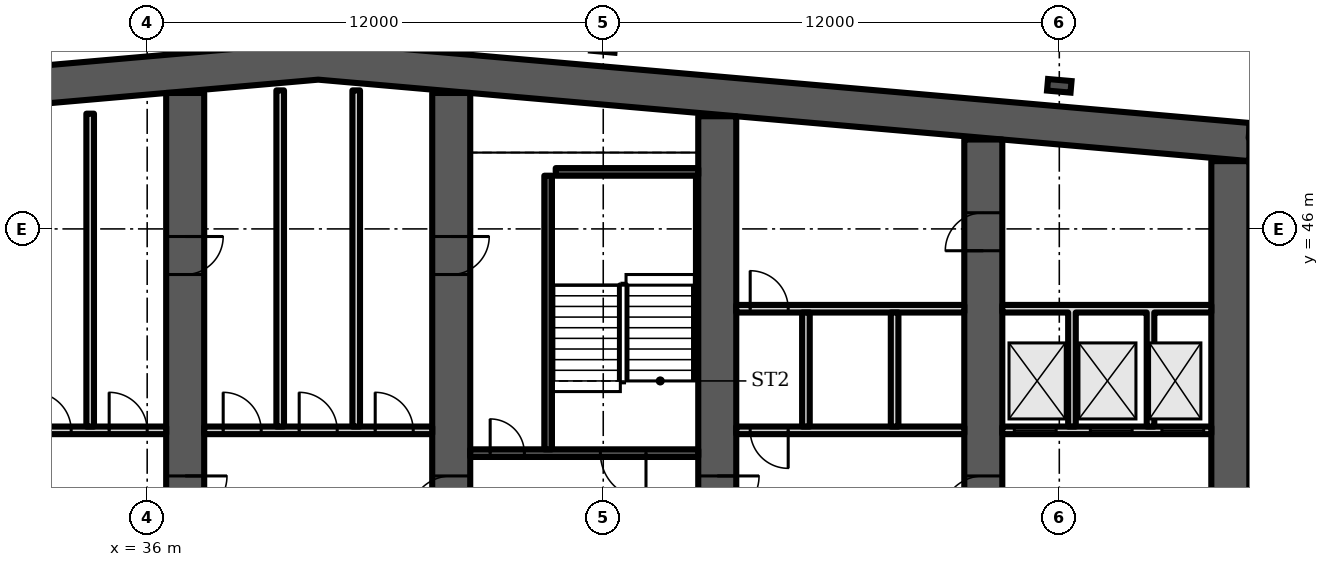
"""IFC4 building model, lengths in metres.
Left out: names, types, materials, properties, quantities, classifications, styles, units other than length and angle.
Written with IfcOpenShell. Run it as: python <this file> out.ifc"""

import sys

from ifc_helpers import new_model, si_unit, direction, frame, frame_2d, origin, origin_2d, place, context, subcontext, project, spatial, polyline, rectangle, i_section, outline, extrude, element, fill, save


model = new_model("IFC4")
c1 = context("Model", 3, precision=1e-05, world=origin(), true_north=direction((0.0, 1.0)))
c2 = subcontext(c1, "Body", "Model", "MODEL_VIEW")
j1 = project(units=[si_unit("LENGTHUNIT", "METRE"), si_unit("PLANEANGLEUNIT", "RADIAN")], contexts=[c1])
p1 = place(None, origin())
s1 = spatial("IfcSite", under=j1, at=p1, CompositionType="ELEMENT")
p2 = place(p1, origin())
s2 = spatial("IfcBuilding", under=s1, at=p2, CompositionType="ELEMENT")
p3 = place(p2, frame((0.0, 0.0, 96.7)))
s3 = spatial("IfcBuildingStorey", under=s2, at=p3, CompositionType="ELEMENT", Elevation=96.7)
p4 = place(p3, origin())
e1 = element("IfcWall", 1, at=p4, inside=s3, PredefinedType="SHEAR", context=c2, shape_type="SweptSolid", body=[
    extrude(outline(polyline([(16.0, 47.784), (40.5, 49.927), (65.0, 47.784), (65.0, 48.787), (40.5, 50.931), (16.0, 48.787), (16.0, 47.784)])), origin(), (0.0, 0.0, 1.0), 3.6),
])
p5 = place(p3, frame((37.0, 35.0, 0.0), z_axis=(0.0, 0.0, 1.0), x_axis=(0.0, 1.0, 0.0)))
e2 = element("IfcWall", 2, at=p5, inside=s3, PredefinedType="SHEAR", context=c2, shape_type="SweptSolid", body=[
    extrude(rectangle(XDim=14.577, YDim=1.0, at=frame_2d((7.289, 0.0))), origin(), (0.0, 0.0, 1.0), 3.6),
])
p6 = place(p5, frame((3.4, 0.0, 0.0)))
e3 = element("IfcOpeningElement", 3, at=p6, cuts=e2, PredefinedType="OPENING", context=c2, shape_type="SweptSolid", body=[
    extrude(rectangle(XDim=1.1, YDim=2.1, at=frame_2d((0.55, 1.05))), frame((0.0, 0.51, 0.0), z_axis=(0.0, -1.0, 0.0), x_axis=(1.0, 0.0, 0.0)), (0.0, 0.0, 1.0), 1.02),
])
p7 = place(p5, frame((9.8, 0.0, 0.0)))
e4 = element("IfcOpeningElement", 4, at=p7, cuts=e2, PredefinedType="OPENING", context=c2, shape_type="SweptSolid", body=[
    extrude(rectangle(XDim=1.0, YDim=2.1, at=frame_2d((0.5, 1.05))), frame((0.0, 0.51, 0.0), z_axis=(0.0, -1.0, 0.0), x_axis=(1.0, 0.0, 0.0)), (0.0, 0.0, 1.0), 1.02),
])
p8 = place(p3, frame((44.0, 35.0, 0.0), z_axis=(0.0, 0.0, 1.0), x_axis=(0.0, 1.0, 0.0)))
e5 = element("IfcWall", 5, at=p8, inside=s3, PredefinedType="SHEAR", context=c2, shape_type="SweptSolid", body=[
    extrude(rectangle(XDim=14.577, YDim=1.0, at=frame_2d((7.289, 0.0))), origin(), (0.0, 0.0, 1.0), 3.6),
])
p9 = place(p8, frame((3.4, 0.0, 0.0)))
e6 = element("IfcOpeningElement", 6, at=p9, cuts=e5, PredefinedType="OPENING", context=c2, shape_type="SweptSolid", body=[
    extrude(rectangle(XDim=1.1, YDim=2.1, at=frame_2d((0.55, 1.05))), frame((0.0, 0.51, 0.0), z_axis=(0.0, -1.0, 0.0), x_axis=(1.0, 0.0, 0.0)), (0.0, 0.0, 1.0), 1.02),
])
p10 = place(p8, frame((9.8, 0.0, 0.0)))
e7 = element("IfcOpeningElement", 7, at=p10, cuts=e5, PredefinedType="OPENING", context=c2, shape_type="SweptSolid", body=[
    extrude(rectangle(XDim=1.0, YDim=2.1, at=frame_2d((0.5, 1.05))), frame((0.0, 0.51, 0.0), z_axis=(0.0, -1.0, 0.0), x_axis=(1.0, 0.0, 0.0)), (0.0, 0.0, 1.0), 1.02),
])
p11 = place(p3, frame((51.0, 35.0, 0.0), z_axis=(0.0, 0.0, 1.0), x_axis=(0.0, 1.0, 0.0)))
e8 = element("IfcWall", 8, at=p11, inside=s3, PredefinedType="SHEAR", context=c2, shape_type="SweptSolid", body=[
    extrude(rectangle(XDim=13.965, YDim=1.0, at=frame_2d((6.982, 0.0))), origin(), (0.0, 0.0, 1.0), 3.6),
])
p12 = place(p11, frame((3.4, 0.0, 0.0)))
e9 = element("IfcOpeningElement", 9, at=p12, cuts=e8, PredefinedType="OPENING", context=c2, shape_type="SweptSolid", body=[
    extrude(rectangle(XDim=1.1, YDim=2.1, at=frame_2d((0.55, 1.05))), frame((0.0, 0.51, 0.0), z_axis=(0.0, -1.0, 0.0), x_axis=(1.0, 0.0, 0.0)), (0.0, 0.0, 1.0), 1.02),
])
p13 = place(p3, frame((58.0, 35.0, 0.0), z_axis=(0.0, 0.0, 1.0), x_axis=(0.0, 1.0, 0.0)))
e10 = element("IfcWall", 10, at=p13, inside=s3, PredefinedType="SHEAR", context=c2, shape_type="SweptSolid", body=[
    extrude(rectangle(XDim=13.352, YDim=1.0, at=frame_2d((6.676, 0.0))), origin(), (0.0, 0.0, 1.0), 3.6),
])
p14 = place(p13, frame((10.426, 0.0, 0.0)))
e11 = element("IfcOpeningElement", 11, at=p14, cuts=e10, PredefinedType="OPENING", context=c2, shape_type="SweptSolid", body=[
    extrude(rectangle(XDim=1.0, YDim=2.1, at=frame_2d((0.5, 1.05))), frame((0.0, 0.51, 0.0), z_axis=(0.0, -1.0, 0.0), x_axis=(1.0, 0.0, 0.0)), (0.0, 0.0, 1.0), 1.02),
])
p15 = place(p13, frame((3.4, 0.0, 0.0)))
e12 = element("IfcOpeningElement", 12, at=p15, cuts=e10, PredefinedType="OPENING", context=c2, shape_type="SweptSolid", body=[
    extrude(rectangle(XDim=1.1, YDim=2.1, at=frame_2d((0.55, 1.05))), frame((0.0, 0.51, 0.0), z_axis=(0.0, -1.0, 0.0), x_axis=(1.0, 0.0, 0.0)), (0.0, 0.0, 1.0), 1.02),
])
p16 = place(p3, frame((64.5, 35.0, 0.0), z_axis=(0.0, 0.0, 1.0), x_axis=(0.0, 1.0, 0.0)))
e13 = element("IfcWall", 13, at=p16, inside=s3, PredefinedType="SHEAR", context=c2, shape_type="SweptSolid", body=[
    extrude(rectangle(XDim=12.784, YDim=1.0, at=frame_2d((6.392, 0.0))), origin(), (0.0, 0.0, 1.0), 3.6),
])
for number, where, z_axis, x_axis in (
    (14, (48.0, 50.815, 0.0), (0.0, 0.0, 1.0), (0.087, 0.996, 0.0)),
    (15, (60.0, 49.765, 0.0), (0.0, 0.0, 1.0), (0.087, 0.996, 0.0)),
):
    element("IfcColumn", number, at=place(p3, frame(where, z_axis=z_axis, x_axis=x_axis)), inside=s3, PredefinedType="COLUMN", context=c2, shape_type="SweptSolid", body=[
        extrude(i_section(OverallWidth=0.305, OverallDepth=0.62, WebThickness=0.021, FlangeThickness=0.04, FilletRadius=0.027, at=origin_2d()), origin(), (0.0, 0.0, 1.0), 3.6),
    ])
p17 = place(p3, frame((67.983, 48.326, 0.0), z_axis=(0.0, 0.0, 1.0), x_axis=(-0.996194, 0.087168, 0.0)))
e16 = element("IfcWall", 16, at=p17, inside=s3, PredefinedType="SOLIDWALL", context=c2, shape_type="SweptSolid", body=[
    extrude(rectangle(XDim=2.994, YDim=0.4, at=frame_2d((1.497, 0.0))), origin(), (0.0, 0.0, 1.0), 3.2),
])
p18 = place(p3, frame((13.0, 49.263, 0.0), z_axis=(0.0, 0.0, 1.0), x_axis=(0.996193, 0.087159, 0.0)))
e17 = element("IfcWall", 17, at=p18, inside=s3, PredefinedType="PARAPET", context=c2, shape_type="SweptSolid", body=[
    extrude(rectangle(XDim=24.092, YDim=0.25, at=frame_2d((12.046, 0.0))), origin(), (0.0, 0.0, 1.0), 1.1),
])
p19 = place(p3, frame((30.5, 40.7, 0.0), z_axis=(0.0, 0.0, 1.0), x_axis=(1.0, 0.0, 0.0)))
e18 = element("IfcWall", 18, at=p19, inside=s3, PredefinedType="PARTITIONING", context=c2, shape_type="SweptSolid", body=[
    extrude(rectangle(XDim=6.0, YDim=0.2, at=frame_2d((3.0, 0.0))), origin(), (0.0, 0.0, 1.0), 3.2),
])
p20 = place(p19, frame((0.5, 0.0, 0.0)))
e19 = element("IfcOpeningElement", 19, at=p20, cuts=e18, PredefinedType="OPENING", context=c2, shape_type="SweptSolid", body=[
    extrude(rectangle(XDim=1.0, YDim=2.1, at=frame_2d((0.5, 1.05))), frame((0.0, 0.11, 0.0), z_axis=(0.0, -1.0, 0.0), x_axis=(1.0, 0.0, 0.0)), (0.0, 0.0, 1.0), 0.22),
])
p21 = place(p19, frame((2.5, 0.0, 0.0)))
e20 = element("IfcOpeningElement", 20, at=p21, cuts=e18, PredefinedType="OPENING", context=c2, shape_type="SweptSolid", body=[
    extrude(rectangle(XDim=1.0, YDim=2.1, at=frame_2d((0.5, 1.05))), frame((0.0, 0.11, 0.0), z_axis=(0.0, -1.0, 0.0), x_axis=(1.0, 0.0, 0.0)), (0.0, 0.0, 1.0), 0.22),
])
p22 = place(p19, frame((4.5, 0.0, 0.0)))
e21 = element("IfcOpeningElement", 21, at=p22, cuts=e18, PredefinedType="OPENING", context=c2, shape_type="SweptSolid", body=[
    extrude(rectangle(XDim=1.0, YDim=2.1, at=frame_2d((0.5, 1.05))), frame((0.0, 0.11, 0.0), z_axis=(0.0, -1.0, 0.0), x_axis=(1.0, 0.0, 0.0)), (0.0, 0.0, 1.0), 0.22),
])
p23 = place(p3, frame((34.5, 40.8, 0.0), z_axis=(0.0, 0.0, 1.0), x_axis=(0.0, 1.0, 0.0)))
e22 = element("IfcWall", 22, at=p23, inside=s3, PredefinedType="PARTITIONING", context=c2, shape_type="SweptSolid", body=[
    extrude(rectangle(XDim=8.232, YDim=0.2, at=frame_2d((4.116, 0.0))), origin(), (0.0, 0.0, 1.0), 3.2),
])
p24 = place(p3, frame((37.5, 40.7, 0.0), z_axis=(0.0, 0.0, 1.0), x_axis=(1.0, 0.0, 0.0)))
e23 = element("IfcWall", 23, at=p24, inside=s3, PredefinedType="PARTITIONING", context=c2, shape_type="SweptSolid", body=[
    extrude(rectangle(XDim=6.0, YDim=0.2, at=frame_2d((3.0, 0.0))), origin(), (0.0, 0.0, 1.0), 3.2),
])
p25 = place(p24, frame((0.5, 0.0, 0.0)))
e24 = element("IfcOpeningElement", 24, at=p25, cuts=e23, PredefinedType="OPENING", context=c2, shape_type="SweptSolid", body=[
    extrude(rectangle(XDim=1.0, YDim=2.1, at=frame_2d((0.5, 1.05))), frame((0.0, 0.11, 0.0), z_axis=(0.0, -1.0, 0.0), x_axis=(1.0, 0.0, 0.0)), (0.0, 0.0, 1.0), 0.22),
])
p26 = place(p24, frame((2.5, 0.0, 0.0)))
e25 = element("IfcOpeningElement", 25, at=p26, cuts=e23, PredefinedType="OPENING", context=c2, shape_type="SweptSolid", body=[
    extrude(rectangle(XDim=1.0, YDim=2.1, at=frame_2d((0.5, 1.05))), frame((0.0, 0.11, 0.0), z_axis=(0.0, -1.0, 0.0), x_axis=(1.0, 0.0, 0.0)), (0.0, 0.0, 1.0), 0.22),
])
p27 = place(p24, frame((4.5, 0.0, 0.0)))
e26 = element("IfcOpeningElement", 26, at=p27, cuts=e23, PredefinedType="OPENING", context=c2, shape_type="SweptSolid", body=[
    extrude(rectangle(XDim=1.0, YDim=2.1, at=frame_2d((0.5, 1.05))), frame((0.0, 0.11, 0.0), z_axis=(0.0, -1.0, 0.0), x_axis=(1.0, 0.0, 0.0)), (0.0, 0.0, 1.0), 0.22),
])
for number, where, z_axis, x_axis in (
    (27, (39.5, 40.8, 0.0), (0.0, 0.0, 1.0), (0.0, 1.0, 0.0)),
    (28, (41.5, 40.8, 0.0), (0.0, 0.0, 1.0), (0.0, 1.0, 0.0)),
):
    element("IfcWall", number, at=place(p3, frame(where, z_axis=z_axis, x_axis=x_axis)), inside=s3, PredefinedType="PARTITIONING", context=c2, shape_type="SweptSolid", body=[
        extrude(rectangle(XDim=8.844, YDim=0.2, at=frame_2d((4.422, 0.0))), origin(), (0.0, 0.0, 1.0), 3.2),
    ])
p28 = place(p3, frame((44.5, 40.1, 0.0), z_axis=(0.0, 0.0, 1.0), x_axis=(1.0, 0.0, 0.0)))
e29 = element("IfcWall", 29, at=p28, inside=s3, PredefinedType="SHEAR", context=c2, shape_type="SweptSolid", body=[
    extrude(rectangle(XDim=6.0, YDim=0.2, at=frame_2d((3.0, 0.0))), origin(), (0.0, 0.0, 1.0), 3.2),
])
p29 = place(p28, frame((3.425, 0.0, 0.0)))
e30 = element("IfcOpeningElement", 30, at=p29, cuts=e29, PredefinedType="OPENING", context=c2, shape_type="SweptSolid", body=[
    extrude(rectangle(XDim=1.2, YDim=2.1, at=frame_2d((0.6, 1.05))), frame((0.0, 0.11, 0.0), z_axis=(0.0, -1.0, 0.0), x_axis=(1.0, 0.0, 0.0)), (0.0, 0.0, 1.0), 0.22),
])
p30 = place(p28, frame((0.525, 0.0, 0.0)))
e31 = element("IfcOpeningElement", 31, at=p30, cuts=e29, PredefinedType="OPENING", context=c2, shape_type="SweptSolid", body=[
    extrude(rectangle(XDim=0.9, YDim=2.1, at=frame_2d((0.45, 1.05))), frame((0.0, 0.11, 0.0), z_axis=(0.0, -1.0, 0.0), x_axis=(1.0, 0.0, 0.0)), (0.0, 0.0, 1.0), 0.22),
])
p31 = place(p3, frame((46.55, 40.2, 0.0), z_axis=(0.0, 0.0, 1.0), x_axis=(0.0, 1.0, 0.0)))
e32 = element("IfcWall", 32, at=p31, inside=s3, PredefinedType="SHEAR", context=c2, shape_type="SweptSolid", body=[
    extrude(rectangle(XDim=7.2, YDim=0.2, at=frame_2d((3.6, 0.0))), origin(), (0.0, 0.0, 1.0), 3.2),
])
p32 = place(p3, frame((46.75, 47.5, 0.0), z_axis=(0.0, 0.0, 1.0), x_axis=(1.0, 0.0, 0.0)))
e33 = element("IfcWall", 33, at=p32, inside=s3, PredefinedType="SHEAR", context=c2, shape_type="SweptSolid", body=[
    extrude(rectangle(XDim=3.75, YDim=0.2, at=frame_2d((1.875, 0.0))), origin(), (0.0, 0.0, 1.0), 3.2),
])
p33 = place(p3, frame((51.5, 40.7, 0.0), z_axis=(0.0, 0.0, 1.0), x_axis=(1.0, 0.0, 0.0)))
e34 = element("IfcWall", 34, at=p33, inside=s3, PredefinedType="PARTITIONING", context=c2, shape_type="SweptSolid", body=[
    extrude(rectangle(XDim=6.0, YDim=0.2, at=frame_2d((3.0, 0.0))), origin(), (0.0, 0.0, 1.0), 3.2),
])
p34 = place(p33, frame((0.367, 0.0, 0.0)))
e35 = element("IfcOpeningElement", 35, at=p34, cuts=e34, PredefinedType="OPENING", context=c2, shape_type="SweptSolid", body=[
    extrude(rectangle(XDim=1.0, YDim=2.1, at=frame_2d((0.5, 1.05))), frame((0.0, 0.11, 0.0), z_axis=(0.0, -1.0, 0.0), x_axis=(1.0, 0.0, 0.0)), (0.0, 0.0, 1.0), 0.22),
])
p35 = place(p3, frame((51.5, 43.9, 0.0), z_axis=(0.0, 0.0, 1.0), x_axis=(1.0, 0.0, 0.0)))
e36 = element("IfcWall", 36, at=p35, inside=s3, PredefinedType="PARTITIONING", context=c2, shape_type="SweptSolid", body=[
    extrude(rectangle(XDim=6.0, YDim=0.2, at=frame_2d((3.0, 0.0))), origin(), (0.0, 0.0, 1.0), 3.2),
])
p36 = place(p35, frame((0.367, 0.0, 0.0)))
e37 = element("IfcOpeningElement", 37, at=p36, cuts=e36, PredefinedType="OPENING", context=c2, shape_type="SweptSolid", body=[
    extrude(rectangle(XDim=1.0, YDim=2.1, at=frame_2d((0.5, 1.05))), frame((0.0, 0.11, 0.0), z_axis=(0.0, -1.0, 0.0), x_axis=(1.0, 0.0, 0.0)), (0.0, 0.0, 1.0), 0.22),
])
p37 = place(p3, frame((0.0, 0.0, -0.0)))
e38 = element("IfcWall", 38, at=p37, inside=s3, PredefinedType="PARTITIONING", context=c2, shape_type="SweptSolid", body=[
    extrude(outline(polyline([(53.233, 40.8), (53.233, 43.8), (53.433, 43.8), (53.433, 40.8), (53.233, 40.8)])), origin(), (0.0, 0.0, 1.0), 3.2),
])
p38 = place(p3, frame((0.0, 0.0, -0.0)))
e39 = element("IfcWall", 39, at=p38, inside=s3, PredefinedType="PARTITIONING", context=c2, shape_type="SweptSolid", body=[
    extrude(outline(polyline([(55.567, 40.8), (55.567, 43.8), (55.767, 43.8), (55.767, 40.8), (55.567, 40.8)])), origin(), (0.0, 0.0, 1.0), 3.2),
])
p39 = place(p3, frame((58.5, 40.7, 0.0), z_axis=(0.0, 0.0, 1.0), x_axis=(1.0, 0.0, 0.0)))
e40 = element("IfcWall", 40, at=p39, inside=s3, PredefinedType="PARTITIONING", context=c2, shape_type="SweptSolid", body=[
    extrude(rectangle(XDim=5.5, YDim=0.2, at=frame_2d((2.75, 0.0))), origin(), (0.0, 0.0, 1.0), 3.2),
])
p40 = place(p39, frame((0.317, 0.0, 0.0)))
e41 = element("IfcOpeningElement", 41, at=p40, cuts=e40, PredefinedType="OPENING", context=c2, shape_type="SweptSolid", body=[
    extrude(rectangle(XDim=1.1, YDim=2.1, at=frame_2d((0.55, 1.05))), frame((0.0, 0.11, 0.0), z_axis=(0.0, -1.0, 0.0), x_axis=(1.0, 0.0, 0.0)), (0.0, 0.0, 1.0), 0.22),
])
p41 = place(p39, frame((2.317, 0.0, 0.0)))
e42 = element("IfcOpeningElement", 42, at=p41, cuts=e40, PredefinedType="OPENING", context=c2, shape_type="SweptSolid", body=[
    extrude(rectangle(XDim=1.1, YDim=2.1, at=frame_2d((0.55, 1.05))), frame((0.0, 0.11, 0.0), z_axis=(0.0, -1.0, 0.0), x_axis=(1.0, 0.0, 0.0)), (0.0, 0.0, 1.0), 0.22),
])
p42 = place(p39, frame((4.2, 0.0, 0.0)))
e43 = element("IfcOpeningElement", 43, at=p42, cuts=e40, PredefinedType="OPENING", context=c2, shape_type="SweptSolid", body=[
    extrude(rectangle(XDim=1.1, YDim=2.1, at=frame_2d((0.55, 1.05))), frame((0.0, 0.11, 0.0), z_axis=(0.0, -1.0, 0.0), x_axis=(1.0, 0.0, 0.0)), (0.0, 0.0, 1.0), 0.22),
])
p43 = place(p3, frame((0.0, 0.0, -0.0)))
e44 = element("IfcWall", 44, at=p43, inside=s3, PredefinedType="PARTITIONING", context=c2, shape_type="SweptSolid", body=[
    extrude(outline(polyline([(60.433, 40.8), (60.233, 40.8), (60.233, 43.8), (58.5, 43.8), (58.5, 44.0), (64.0, 44.0), (64.0, 43.8), (62.5, 43.8), (62.5, 40.8), (62.3, 40.8), (62.3, 43.8), (60.433, 43.8), (60.433, 40.8)])), origin(), (0.0, 0.0, 1.0), 3.2),
])
p44 = place(p21, origin())
e45 = element("IfcDoor", 45, at=p44, inside=s3, OperationType="SINGLE_SWING_LEFT", PredefinedType="DOOR", context=c2, shape_type="SweptSolid", body=[
    extrude(rectangle(XDim=1.0, YDim=2.1, at=frame_2d((0.5, 1.05))), frame((0.0, 0.025, 0.0), z_axis=(0.0, -1.0, 0.0), x_axis=(1.0, 0.0, 0.0)), (0.0, 0.0, 1.0), 0.05),
])
fill(e20, e45)
p45 = place(p22, origin())
e46 = element("IfcDoor", 46, at=p45, inside=s3, OperationType="SINGLE_SWING_LEFT", PredefinedType="DOOR", context=c2, shape_type="SweptSolid", body=[
    extrude(rectangle(XDim=1.0, YDim=2.1, at=frame_2d((0.5, 1.05))), frame((0.0, 0.025, 0.0), z_axis=(0.0, -1.0, 0.0), x_axis=(1.0, 0.0, 0.0)), (0.0, 0.0, 1.0), 0.05),
])
fill(e21, e46)
p46 = place(p25, origin())
e47 = element("IfcDoor", 47, at=p46, inside=s3, OperationType="SINGLE_SWING_LEFT", PredefinedType="DOOR", context=c2, shape_type="SweptSolid", body=[
    extrude(rectangle(XDim=1.0, YDim=2.1, at=frame_2d((0.5, 1.05))), frame((0.0, 0.025, 0.0), z_axis=(0.0, -1.0, 0.0), x_axis=(1.0, 0.0, 0.0)), (0.0, 0.0, 1.0), 0.05),
])
fill(e24, e47)
p47 = place(p26, origin())
e48 = element("IfcDoor", 48, at=p47, inside=s3, OperationType="SINGLE_SWING_LEFT", PredefinedType="DOOR", context=c2, shape_type="SweptSolid", body=[
    extrude(rectangle(XDim=1.0, YDim=2.1, at=frame_2d((0.5, 1.05))), frame((0.0, 0.025, 0.0), z_axis=(0.0, -1.0, 0.0), x_axis=(1.0, 0.0, 0.0)), (0.0, 0.0, 1.0), 0.05),
])
fill(e25, e48)
p48 = place(p27, origin())
e49 = element("IfcDoor", 49, at=p48, inside=s3, OperationType="SINGLE_SWING_LEFT", PredefinedType="DOOR", context=c2, shape_type="SweptSolid", body=[
    extrude(rectangle(XDim=1.0, YDim=2.1, at=frame_2d((0.5, 1.05))), frame((0.0, 0.025, 0.0), z_axis=(0.0, -1.0, 0.0), x_axis=(1.0, 0.0, 0.0)), (0.0, 0.0, 1.0), 0.05),
])
fill(e26, e49)
p49 = place(p29, origin())
e50 = element("IfcDoor", 50, at=p49, inside=s3, OperationType="SINGLE_SWING_RIGHT", PredefinedType="DOOR", context=c2, shape_type="SweptSolid", body=[
    extrude(rectangle(XDim=1.2, YDim=2.1, at=frame_2d((0.6, 1.05))), frame((0.0, 0.025, 0.0), z_axis=(0.0, -1.0, 0.0), x_axis=(1.0, 0.0, 0.0)), (0.0, 0.0, 1.0), 0.05),
])
fill(e30, e50)
p50 = place(p30, origin())
e51 = element("IfcDoor", 51, at=p50, inside=s3, OperationType="SINGLE_SWING_LEFT", PredefinedType="DOOR", context=c2, shape_type="SweptSolid", body=[
    extrude(rectangle(XDim=0.9, YDim=2.1, at=frame_2d((0.45, 1.05))), frame((0.0, 0.025, 0.0), z_axis=(0.0, -1.0, 0.0), x_axis=(1.0, 0.0, 0.0)), (0.0, 0.0, 1.0), 0.05),
])
fill(e31, e51)
p51 = place(p34, origin())
e52 = element("IfcDoor", 52, at=p51, inside=s3, OperationType="SINGLE_SWING_RIGHT", PredefinedType="DOOR", context=c2, shape_type="SweptSolid", body=[
    extrude(rectangle(XDim=1.0, YDim=2.1, at=frame_2d((0.5, 1.05))), frame((0.0, 0.025, 0.0), z_axis=(0.0, -1.0, 0.0), x_axis=(1.0, 0.0, 0.0)), (0.0, 0.0, 1.0), 0.05),
])
fill(e35, e52)
p52 = place(p36, origin())
e53 = element("IfcDoor", 53, at=p52, inside=s3, OperationType="SINGLE_SWING_LEFT", PredefinedType="DOOR", context=c2, shape_type="SweptSolid", body=[
    extrude(rectangle(XDim=1.0, YDim=2.1, at=frame_2d((0.5, 1.05))), frame((0.0, 0.025, 0.0), z_axis=(0.0, -1.0, 0.0), x_axis=(1.0, 0.0, 0.0)), (0.0, 0.0, 1.0), 0.05),
])
fill(e37, e53)
p53 = place(p40, origin())
e54 = element("IfcDoor", 54, at=p53, inside=s3, OperationType="DOUBLE_DOOR_SLIDING", PredefinedType="DOOR", context=c2, shape_type="SweptSolid", body=[
    extrude(rectangle(XDim=1.1, YDim=2.1, at=frame_2d((0.55, 1.05))), frame((0.0, 0.025, 0.0), z_axis=(0.0, -1.0, 0.0), x_axis=(1.0, 0.0, 0.0)), (0.0, 0.0, 1.0), 0.05),
])
fill(e41, e54)
p54 = place(p41, origin())
e55 = element("IfcDoor", 55, at=p54, inside=s3, OperationType="DOUBLE_DOOR_SLIDING", PredefinedType="DOOR", context=c2, shape_type="SweptSolid", body=[
    extrude(rectangle(XDim=1.1, YDim=2.1, at=frame_2d((0.55, 1.05))), frame((0.0, 0.025, 0.0), z_axis=(0.0, -1.0, 0.0), x_axis=(1.0, 0.0, 0.0)), (0.0, 0.0, 1.0), 0.05),
])
fill(e42, e55)
p55 = place(p42, origin())
e56 = element("IfcDoor", 56, at=p55, inside=s3, OperationType="DOUBLE_DOOR_SLIDING", PredefinedType="DOOR", context=c2, shape_type="SweptSolid", body=[
    extrude(rectangle(XDim=1.1, YDim=2.1, at=frame_2d((0.55, 1.05))), frame((0.0, 0.025, 0.0), z_axis=(0.0, -1.0, 0.0), x_axis=(1.0, 0.0, 0.0)), (0.0, 0.0, 1.0), 0.05),
])
fill(e43, e56)
p56 = place(p14, origin())
e57 = element("IfcDoor", 57, at=p56, inside=s3, OperationType="SINGLE_SWING_LEFT", PredefinedType="DOOR", context=c2, shape_type="SweptSolid", body=[
    extrude(rectangle(XDim=1.0, YDim=2.1, at=frame_2d((0.5, 1.05))), frame((0.0, 0.5, 0.0), z_axis=(0.0, -1.0, 0.0), x_axis=(1.0, 0.0, 0.0)), (0.0, 0.0, 1.0), 1.0),
])
fill(e11, e57)
p57 = place(p6, origin())
e58 = element("IfcDoor", 58, at=p57, inside=s3, OperationType="SINGLE_SWING_RIGHT", PredefinedType="DOOR", context=c2, shape_type="SweptSolid", body=[
    extrude(rectangle(XDim=1.1, YDim=2.1, at=frame_2d((0.55, 1.05))), frame((0.0, 0.025, 0.0), z_axis=(0.0, -1.0, 0.0), x_axis=(1.0, 0.0, 0.0)), (0.0, 0.0, 1.0), 0.05),
])
fill(e3, e58)
p58 = place(p7, origin())
e59 = element("IfcDoor", 59, at=p58, inside=s3, OperationType="SINGLE_SWING_RIGHT", PredefinedType="DOOR", context=c2, shape_type="SweptSolid", body=[
    extrude(rectangle(XDim=1.0, YDim=2.1, at=frame_2d((0.5, 1.05))), frame((0.0, 0.5, 0.0), z_axis=(0.0, -1.0, 0.0), x_axis=(1.0, 0.0, 0.0)), (0.0, 0.0, 1.0), 1.0),
])
fill(e4, e59)
p59 = place(p9, origin())
e60 = element("IfcDoor", 60, at=p59, inside=s3, OperationType="SINGLE_SWING_LEFT", PredefinedType="DOOR", context=c2, shape_type="SweptSolid", body=[
    extrude(rectangle(XDim=1.1, YDim=2.1, at=frame_2d((0.55, 1.05))), frame((0.0, 0.025, 0.0), z_axis=(0.0, -1.0, 0.0), x_axis=(1.0, 0.0, 0.0)), (0.0, 0.0, 1.0), 0.05),
])
fill(e6, e60)
p60 = place(p10, origin())
e61 = element("IfcDoor", 61, at=p60, inside=s3, OperationType="SINGLE_SWING_RIGHT", PredefinedType="DOOR", context=c2, shape_type="SweptSolid", body=[
    extrude(rectangle(XDim=1.0, YDim=2.1, at=frame_2d((0.5, 1.05))), frame((0.0, 0.5, 0.0), z_axis=(0.0, -1.0, 0.0), x_axis=(1.0, 0.0, 0.0)), (0.0, 0.0, 1.0), 1.0),
])
fill(e7, e61)
p61 = place(p12, origin())
e62 = element("IfcDoor", 62, at=p61, inside=s3, OperationType="SINGLE_SWING_RIGHT", PredefinedType="DOOR", context=c2, shape_type="SweptSolid", body=[
    extrude(rectangle(XDim=1.1, YDim=2.1, at=frame_2d((0.55, 1.05))), frame((0.0, 0.025, 0.0), z_axis=(0.0, -1.0, 0.0), x_axis=(1.0, 0.0, 0.0)), (0.0, 0.0, 1.0), 0.05),
])
fill(e9, e62)
p62 = place(p15, origin())
e63 = element("IfcDoor", 63, at=p62, inside=s3, OperationType="SINGLE_SWING_LEFT", PredefinedType="DOOR", context=c2, shape_type="SweptSolid", body=[
    extrude(rectangle(XDim=1.1, YDim=2.1, at=frame_2d((0.55, 1.05))), frame((0.0, 0.025, 0.0), z_axis=(0.0, -1.0, 0.0), x_axis=(1.0, 0.0, 0.0)), (0.0, 0.0, 1.0), 0.05),
])
fill(e12, e63)
save(model, sys.argv[1])
